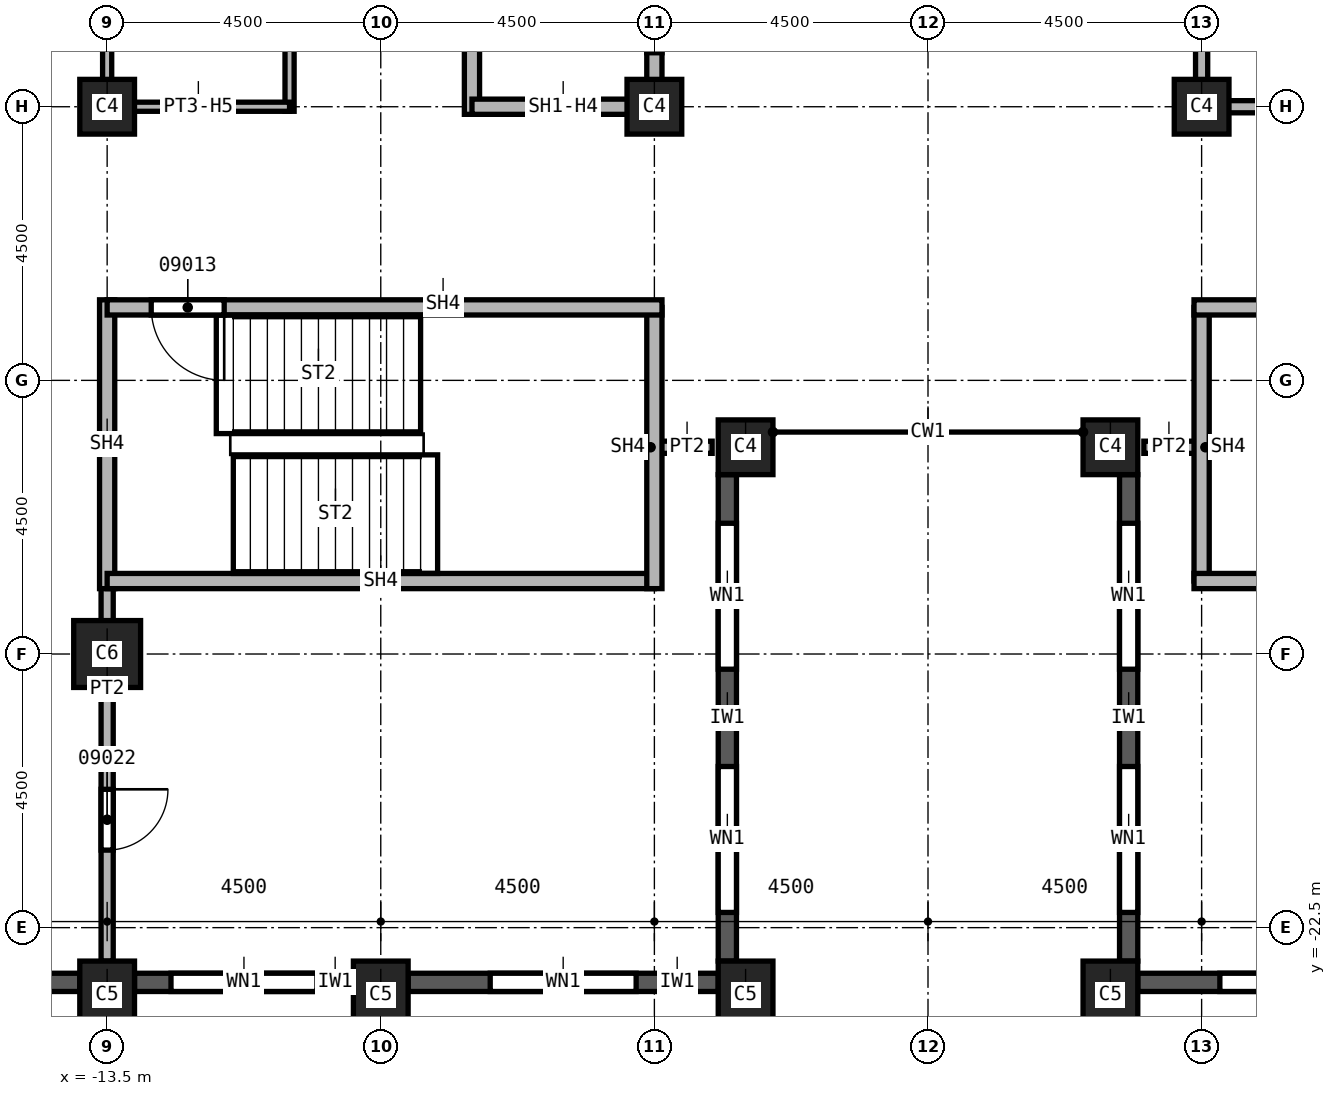
"""IFC4 building model, lengths in metres.
Left out: names, types, materials, properties, quantities, classifications, styles, units other than length and angle.
Written with IfcOpenShell. Run it as: python <this file> out.ifc"""

import sys

from ifc_helpers import new_model, si_unit, direction, frame, frame_2d, origin, origin_2d, place, context, subcontext, project, spatial, rectangle, extrude, element, fill, save


model = new_model("IFC4")
c1 = context("Model", 3, precision=1e-05, world=origin(), true_north=direction((0.0, 1.0)))
c2 = subcontext(c1, "Body", "Model", "MODEL_VIEW")
j1 = project(units=[si_unit("LENGTHUNIT", "METRE"), si_unit("PLANEANGLEUNIT", "RADIAN")], contexts=[c1])
p1 = place(None, origin())
s1 = spatial("IfcSite", under=j1, at=p1, CompositionType="ELEMENT")
p2 = place(p1, origin())
s2 = spatial("IfcBuilding", under=s1, at=p2, CompositionType="ELEMENT")
p3 = place(p2, frame((0.0, 0.0, 166.0)))
s3 = spatial("IfcBuildingStorey", under=s2, at=p3, CompositionType="ELEMENT", Elevation=166.0)
p4 = place(p3, frame((-13.5, -18.0, 0.0), z_axis=(0.0, 0.0, 1.0), x_axis=(1.0, 0.0, 0.0)))
e1 = element("IfcColumn", 1, at=p4, inside=s3, PredefinedType="COLUMN", context=c2, shape_type="SweptSolid", body=[
    extrude(rectangle(XDim=1.1, YDim=1.1, at=origin_2d()), origin(), (0.0, 0.0, 1.0), 3.7),
])
for number, where, z_axis, x_axis in (
    (2, (4.5, -9.0, 0.0), (0.0, 0.0, 1.0), (1.0, 0.0, 0.0)),
    (3, (-4.5, -9.0, 0.0), (0.0, 0.0, 1.0), (1.0, 0.0, 0.0)),
    (4, (-13.5, -9.0, 0.0), (0.0, 0.0, 1.0), (1.0, 0.0, 0.0)),
):
    element("IfcColumn", number, at=place(p3, frame(where, z_axis=z_axis, x_axis=x_axis)), inside=s3, PredefinedType="COLUMN", context=c2, shape_type="SweptSolid", body=[
        extrude(rectangle(XDim=0.9, YDim=0.9, at=origin_2d()), origin(), (0.0, 0.0, 1.0), 3.7),
    ])
for number, where, z_axis, x_axis in (
    (5, (3.0, -23.6, 0.0), (0.0, 0.0, 1.0), (1.0, 0.0, 0.0)),
    (6, (-3.0, -23.6, 0.0), (0.0, 0.0, 1.0), (1.0, 0.0, 0.0)),
    (7, (-9.0, -23.6, 0.0), (0.0, 0.0, 1.0), (1.0, 0.0, 0.0)),
    (8, (-13.5, -23.6, 0.0), (0.0, 0.0, 1.0), (1.0, 0.0, 0.0)),
):
    element("IfcColumn", number, at=place(p3, frame(where, z_axis=z_axis, x_axis=x_axis)), inside=s3, PredefinedType="COLUMN", context=c2, shape_type="SweptSolid", body=[
        extrude(rectangle(XDim=0.9, YDim=1.1, at=origin_2d()), origin(), (0.0, 0.0, 1.0), 3.7),
    ])
for number, where, z_axis, x_axis in (
    (9, (3.0, -14.6, 0.0), (0.0, 0.0, 1.0), (1.0, 0.0, 0.0)),
    (10, (-3.0, -14.6, 0.0), (0.0, 0.0, 1.0), (1.0, 0.0, 0.0)),
):
    element("IfcColumn", number, at=place(p3, frame(where, z_axis=z_axis, x_axis=x_axis)), inside=s3, PredefinedType="COLUMN", context=c2, shape_type="SweptSolid", body=[
        extrude(rectangle(XDim=0.9, YDim=0.9, at=origin_2d()), origin(), (0.0, 0.0, 1.0), 3.7),
    ])
p5 = place(p3, frame((-17.55, -23.4, 0.0), z_axis=(0.0, 0.0, 1.0), x_axis=(1.0, 0.0, 0.0)))
e11 = element("IfcWall", 11, at=p5, inside=s3, PredefinedType="SOLIDWALL", context=c2, shape_type="SweptSolid", body=[
    extrude(rectangle(XDim=3.6, YDim=0.3, at=frame_2d((1.8, 0.0))), origin(), (0.0, 0.0, 1.0), 3.1),
])
p6 = place(p5, frame((0.775, 0.0, 0.8)))
e12 = element("IfcOpeningElement", 12, at=p6, cuts=e11, PredefinedType="OPENING", context=c2, shape_type="SweptSolid", body=[
    extrude(rectangle(XDim=1.0, YDim=1.95, at=frame_2d((0.5, 0.975))), frame((0.0, 0.15, 0.0), z_axis=(0.0, -1.0, 0.0), x_axis=(1.0, 0.0, 0.0)), (0.0, 0.0, 1.0), 0.3),
])
p7 = place(p5, frame((2.375, 0.0, 0.8)))
e13 = element("IfcOpeningElement", 13, at=p7, cuts=e11, PredefinedType="OPENING", context=c2, shape_type="SweptSolid", body=[
    extrude(rectangle(XDim=0.6, YDim=1.95, at=frame_2d((0.3, 0.975))), frame((0.0, 0.15, 0.0), z_axis=(0.0, -1.0, 0.0), x_axis=(1.0, 0.0, 0.0)), (0.0, 0.0, 1.0), 0.3),
])
p8 = place(p3, frame((-13.05, -23.4, 0.0), z_axis=(0.0, 0.0, 1.0), x_axis=(1.0, 0.0, 0.0)))
e14 = element("IfcWall", 14, at=p8, inside=s3, PredefinedType="SOLIDWALL", context=c2, shape_type="SweptSolid", body=[
    extrude(rectangle(XDim=3.6, YDim=0.3, at=frame_2d((1.8, 0.0))), origin(), (0.0, 0.0, 1.0), 3.1),
])
p9 = place(p8, frame((0.6, 0.0, 0.8)))
e15 = element("IfcOpeningElement", 15, at=p9, cuts=e14, PredefinedType="OPENING", context=c2, shape_type="SweptSolid", body=[
    extrude(rectangle(XDim=2.4, YDim=1.95, at=frame_2d((1.2, 0.975))), frame((0.0, 0.15, 0.0), z_axis=(0.0, -1.0, 0.0), x_axis=(1.0, 0.0, 0.0)), (0.0, 0.0, 1.0), 0.3),
])
p10 = place(p3, frame((-8.55, -23.4, 0.0), z_axis=(0.0, 0.0, 1.0), x_axis=(1.0, 0.0, 0.0)))
e16 = element("IfcWall", 16, at=p10, inside=s3, PredefinedType="SOLIDWALL", context=c2, shape_type="SweptSolid", body=[
    extrude(rectangle(XDim=5.1, YDim=0.3, at=frame_2d((2.55, 0.0))), origin(), (0.0, 0.0, 1.0), 3.1),
])
p11 = place(p10, frame((1.35, 0.0, 0.8)))
e17 = element("IfcOpeningElement", 17, at=p11, cuts=e16, PredefinedType="OPENING", context=c2, shape_type="SweptSolid", body=[
    extrude(rectangle(XDim=2.4, YDim=1.95, at=frame_2d((1.2, 0.975))), frame((0.0, 0.15, 0.0), z_axis=(0.0, -1.0, 0.0), x_axis=(1.0, 0.0, 0.0)), (0.0, 0.0, 1.0), 0.3),
])
p12 = place(p3, frame((-3.3, -23.05, 0.0), z_axis=(0.0, 0.0, 1.0), x_axis=(0.0, 1.0, 0.0)))
e18 = element("IfcWall", 18, at=p12, inside=s3, PredefinedType="SOLIDWALL", context=c2, shape_type="SweptSolid", body=[
    extrude(rectangle(XDim=8.0, YDim=0.3, at=frame_2d((4.0, 0.0))), origin(), (0.0, 0.0, 1.0), 3.1),
])
p13 = place(p12, frame((0.8, 0.0, 0.8)))
e19 = element("IfcOpeningElement", 19, at=p13, cuts=e18, PredefinedType="OPENING", context=c2, shape_type="SweptSolid", body=[
    extrude(rectangle(XDim=2.4, YDim=1.95, at=frame_2d((1.2, 0.975))), frame((0.0, 0.15, 0.0), z_axis=(0.0, -1.0, 0.0), x_axis=(1.0, 0.0, 0.0)), (0.0, 0.0, 1.0), 0.3),
])
p14 = place(p12, frame((4.8, 0.0, 0.8)))
e20 = element("IfcOpeningElement", 20, at=p14, cuts=e18, PredefinedType="OPENING", context=c2, shape_type="SweptSolid", body=[
    extrude(rectangle(XDim=2.4, YDim=1.95, at=frame_2d((1.2, 0.975))), frame((0.0, 0.15, 0.0), z_axis=(0.0, -1.0, 0.0), x_axis=(1.0, 0.0, 0.0)), (0.0, 0.0, 1.0), 0.3),
])
p15 = place(p3, frame((3.3, -15.05, 0.0), z_axis=(0.0, 0.0, 1.0), x_axis=(0.0, -1.0, 0.0)))
e21 = element("IfcWall", 21, at=p15, inside=s3, PredefinedType="SOLIDWALL", context=c2, shape_type="SweptSolid", body=[
    extrude(rectangle(XDim=8.0, YDim=0.3, at=frame_2d((4.0, 0.0))), origin(), (0.0, 0.0, 1.0), 3.1),
])
p16 = place(p15, frame((0.8, 0.0, 0.8)))
e22 = element("IfcOpeningElement", 22, at=p16, cuts=e21, PredefinedType="OPENING", context=c2, shape_type="SweptSolid", body=[
    extrude(rectangle(XDim=2.4, YDim=1.95, at=frame_2d((1.2, 0.975))), frame((0.0, 0.15, 0.0), z_axis=(0.0, -1.0, 0.0), x_axis=(1.0, 0.0, 0.0)), (0.0, 0.0, 1.0), 0.3),
])
p17 = place(p15, frame((4.8, 0.0, 0.8)))
e23 = element("IfcOpeningElement", 23, at=p17, cuts=e21, PredefinedType="OPENING", context=c2, shape_type="SweptSolid", body=[
    extrude(rectangle(XDim=2.4, YDim=1.95, at=frame_2d((1.2, 0.975))), frame((0.0, 0.15, 0.0), z_axis=(0.0, -1.0, 0.0), x_axis=(1.0, 0.0, 0.0)), (0.0, 0.0, 1.0), 0.3),
])
p18 = place(p3, frame((3.45, -23.4, 0.0), z_axis=(0.0, 0.0, 1.0), x_axis=(1.0, 0.0, 0.0)))
e24 = element("IfcWall", 24, at=p18, inside=s3, PredefinedType="SOLIDWALL", context=c2, shape_type="SweptSolid", body=[
    extrude(rectangle(XDim=5.1, YDim=0.3, at=frame_2d((2.55, 0.0))), origin(), (0.0, 0.0, 1.0), 3.1),
])
p19 = place(p18, frame((1.35, 0.0, 0.8)))
e25 = element("IfcOpeningElement", 25, at=p19, cuts=e24, PredefinedType="OPENING", context=c2, shape_type="SweptSolid", body=[
    extrude(rectangle(XDim=2.4, YDim=1.95, at=frame_2d((1.2, 0.975))), frame((0.0, 0.15, 0.0), z_axis=(0.0, -1.0, 0.0), x_axis=(1.0, 0.0, 0.0)), (0.0, 0.0, 1.0), 0.3),
])
p20 = place(p3, frame((-13.5, -16.675, 0.0), z_axis=(0.0, 0.0, 1.0), x_axis=(0.0, -1.0, 0.0)))
e26 = element("IfcWall", 26, at=p20, inside=s3, PredefinedType="PARTITIONING", context=c2, shape_type="SweptSolid", body=[
    extrude(rectangle(XDim=6.375, YDim=0.2, at=frame_2d((3.188, 0.0))), origin(), (0.0, 0.0, 1.0), 3.7),
])
p21 = place(p20, frame((3.55, 0.0, 0.0)))
e27 = element("IfcOpeningElement", 27, at=p21, cuts=e26, PredefinedType="OPENING", context=c2, shape_type="SweptSolid", body=[
    extrude(rectangle(XDim=1.0, YDim=2.1, at=frame_2d((0.5, 1.05))), frame((0.0, 0.1, 0.0), z_axis=(0.0, -1.0, 0.0), x_axis=(1.0, 0.0, 0.0)), (0.0, 0.0, 1.0), 0.2),
])
for number, where, z_axis, x_axis in (
    (28, (-3.55, -14.6, 0.0), (0.0, 0.0, 1.0), (-1.0, 0.0, 0.0)),
    (29, (4.5, -14.6, 0.0), (0.0, 0.0, 1.0), (-1.0, 0.0, 0.0)),
):
    element("IfcWall", number, at=place(p3, frame(where, z_axis=z_axis, x_axis=x_axis)), inside=s3, PredefinedType="PARTITIONING", context=c2, shape_type="SweptSolid", body=[
        extrude(rectangle(XDim=0.95, YDim=0.2, at=frame_2d((0.475, 0.0))), origin(), (0.0, 0.0, 1.0), 3.7),
    ])
p22 = place(p3, frame((4.5, -9.1, 0.0), z_axis=(0.0, 0.0, 1.0), x_axis=(0.0, 1.0, 0.0)))
e30 = element("IfcWall", 30, at=p22, inside=s3, PredefinedType="SOLIDWALL", context=c2, shape_type="SweptSolid", body=[
    extrude(rectangle(XDim=9.1, YDim=0.2, at=frame_2d((4.55, 0.0))), origin(), (0.0, 0.0, 1.0), 2.938),
])
p23 = place(p22, frame((3.1, 0.0, 0.0)))
e31 = element("IfcOpeningElement", 31, at=p23, cuts=e30, PredefinedType="OPENING", context=c2, shape_type="SweptSolid", body=[
    extrude(rectangle(XDim=1.1, YDim=2.1, at=frame_2d((0.55, 1.05))), frame((0.0, 0.1, 0.0), z_axis=(0.0, -1.0, 0.0), x_axis=(1.0, 0.0, 0.0)), (0.0, 0.0, 1.0), 0.2),
])
p24 = place(p3, frame((7.5, -9.0, 0.0), z_axis=(0.0, 0.0, 1.0), x_axis=(-1.0, 0.0, 0.0)))
e32 = element("IfcWall", 32, at=p24, inside=s3, PredefinedType="SOLIDWALL", context=c2, shape_type="SweptSolid", body=[
    extrude(rectangle(XDim=3.0, YDim=0.2, at=frame_2d((1.5, 0.0))), origin(), (0.0, 0.0, 1.0), 2.938),
])
p25 = place(p3, frame((-7.5, -9.125, 0.0), z_axis=(0.0, 0.0, 1.0), x_axis=(0.0, 1.0, 0.0)))
e33 = element("IfcWall", 33, at=p25, inside=s3, PredefinedType="SOLIDWALL", context=c2, shape_type="SweptSolid", body=[
    extrude(rectangle(XDim=12.25, YDim=0.25, at=frame_2d((6.125, 0.0))), origin(), (0.0, 0.0, 1.0), 3.7),
])
p26 = place(p3, frame((-4.5, -9.0, 0.0), z_axis=(0.0, 0.0, 1.0), x_axis=(-1.0, 0.0, 0.0)))
e34 = element("IfcWall", 34, at=p26, inside=s3, PredefinedType="SOLIDWALL", context=c2, shape_type="SweptSolid", body=[
    extrude(rectangle(XDim=3.0, YDim=0.25, at=frame_2d((1.5, 0.0))), origin(), (0.0, 0.0, 1.0), 2.938),
])
p27 = place(p3, frame((-4.5, 0.0, 0.0), z_axis=(0.0, 0.0, 1.0), x_axis=(0.0, -1.0, 0.0)))
e35 = element("IfcWall", 35, at=p27, inside=s3, PredefinedType="SOLIDWALL", context=c2, shape_type="SweptSolid", body=[
    extrude(rectangle(XDim=9.125, YDim=0.25, at=frame_2d((4.562, 0.0))), origin(), (0.0, 0.0, 1.0), 2.938),
])
p28 = place(p27, frame((7.012, 0.0, 0.0)))
e36 = element("IfcOpeningElement", 36, at=p28, cuts=e35, PredefinedType="OPENING", context=c2, shape_type="SweptSolid", body=[
    extrude(rectangle(XDim=1.1, YDim=2.1, at=frame_2d((0.55, 1.05))), frame((0.0, 0.125, 0.0), z_axis=(0.0, -1.0, 0.0), x_axis=(1.0, 0.0, 0.0)), (0.0, 0.0, 1.0), 0.25),
])
p29 = place(p27, frame((3.95, 0.0, 0.0)))
e37 = element("IfcOpeningElement", 37, at=p29, cuts=e35, PredefinedType="OPENING", context=c2, shape_type="SweptSolid", body=[
    extrude(rectangle(XDim=1.1, YDim=2.1, at=frame_2d((0.55, 1.05))), frame((0.0, 0.125, 0.0), z_axis=(0.0, -1.0, 0.0), x_axis=(1.0, 0.0, 0.0)), (0.0, 0.0, 1.0), 0.25),
])
p30 = place(p27, frame((0.95, 0.0, 0.0)))
e38 = element("IfcOpeningElement", 38, at=p30, cuts=e35, PredefinedType="OPENING", context=c2, shape_type="SweptSolid", body=[
    extrude(rectangle(XDim=1.1, YDim=2.1, at=frame_2d((0.55, 1.05))), frame((0.0, 0.125, 0.0), z_axis=(0.0, -1.0, 0.0), x_axis=(1.0, 0.0, 0.0)), (0.0, 0.0, 1.0), 0.25),
])
p31 = place(p3, frame((-13.5, -12.175, 0.0), z_axis=(0.0, 0.0, 1.0), x_axis=(0.0, -1.0, 0.0)))
e39 = element("IfcWall", 39, at=p31, inside=s3, PredefinedType="SOLIDWALL", context=c2, shape_type="SweptSolid", body=[
    extrude(rectangle(XDim=4.75, YDim=0.25, at=frame_2d((2.375, 0.0))), origin(), (0.0, 0.0, 1.0), 3.7),
])
p32 = place(p3, frame((-4.5, -16.8, 0.0), z_axis=(0.0, 0.0, 1.0), x_axis=(-1.0, 0.0, 0.0)))
e40 = element("IfcWall", 40, at=p32, inside=s3, PredefinedType="SOLIDWALL", context=c2, shape_type="SweptSolid", body=[
    extrude(rectangle(XDim=9.0, YDim=0.25, at=frame_2d((4.5, 0.0))), origin(), (0.0, 0.0, 1.0), 3.7),
])
p33 = place(p3, frame((-4.5, -12.3, 0.0), z_axis=(0.0, 0.0, 1.0), x_axis=(0.0, -1.0, 0.0)))
e41 = element("IfcWall", 41, at=p33, inside=s3, PredefinedType="SOLIDWALL", context=c2, shape_type="SweptSolid", body=[
    extrude(rectangle(XDim=4.625, YDim=0.25, at=frame_2d((2.312, 0.0))), origin(), (0.0, 0.0, 1.0), 3.7),
])
p34 = place(p3, frame((-4.375, -12.3, 0.0), z_axis=(0.0, 0.0, 1.0), x_axis=(-1.0, 0.0, 0.0)))
e42 = element("IfcWall", 42, at=p34, inside=s3, PredefinedType="SOLIDWALL", context=c2, shape_type="SweptSolid", body=[
    extrude(rectangle(XDim=9.125, YDim=0.25, at=frame_2d((4.562, 0.0))), origin(), (0.0, 0.0, 1.0), 3.7),
])
p35 = place(p34, frame((7.2, 0.0, 0.0)))
e43 = element("IfcOpeningElement", 43, at=p35, cuts=e42, PredefinedType="OPENING", context=c2, shape_type="SweptSolid", body=[
    extrude(rectangle(XDim=1.2, YDim=2.1, at=frame_2d((0.6, 1.05))), frame((0.0, 0.125, 0.0), z_axis=(0.0, -1.0, 0.0), x_axis=(1.0, 0.0, 0.0)), (0.0, 0.0, 1.0), 0.25),
])
p36 = place(p3, frame((4.5, -16.8, 0.0), z_axis=(0.0, 0.0, 1.0), x_axis=(0.0, 1.0, 0.0)))
e44 = element("IfcWall", 44, at=p36, inside=s3, PredefinedType="SOLIDWALL", context=c2, shape_type="SweptSolid", body=[
    extrude(rectangle(XDim=4.5, YDim=0.25, at=frame_2d((2.25, 0.0))), origin(), (0.0, 0.0, 1.0), 3.7),
])
p37 = place(p3, frame((13.5, -16.8, 0.0), z_axis=(0.0, 0.0, 1.0), x_axis=(-1.0, 0.0, 0.0)))
e45 = element("IfcWall", 45, at=p37, inside=s3, PredefinedType="SOLIDWALL", context=c2, shape_type="SweptSolid", body=[
    extrude(rectangle(XDim=9.125, YDim=0.25, at=frame_2d((4.562, 0.0))), origin(), (0.0, 0.0, 1.0), 3.7),
])
p38 = place(p3, frame((13.5, -12.3, 0.0), z_axis=(0.0, 0.0, 1.0), x_axis=(-1.0, 0.0, 0.0)))
e46 = element("IfcWall", 46, at=p38, inside=s3, PredefinedType="SOLIDWALL", context=c2, shape_type="SweptSolid", body=[
    extrude(rectangle(XDim=9.125, YDim=0.25, at=frame_2d((4.562, 0.0))), origin(), (0.0, 0.0, 1.0), 3.7),
])
p39 = place(p38, frame((0.6, 0.0, 0.0)))
e47 = element("IfcOpeningElement", 47, at=p39, cuts=e46, PredefinedType="OPENING", context=c2, shape_type="SweptSolid", body=[
    extrude(rectangle(XDim=1.2, YDim=2.1, at=frame_2d((0.6, 1.05))), frame((0.0, 0.125, 0.0), z_axis=(0.0, -1.0, 0.0), x_axis=(1.0, 0.0, 0.0)), (0.0, 0.0, 1.0), 0.25),
])
p40 = place(p3, frame((-13.5, -9.075, 0.0), z_axis=(0.0, 0.0, 1.0), x_axis=(0.0, 1.0, 0.0)))
e48 = element("IfcWall", 48, at=p40, inside=s3, PredefinedType="PARTITIONING", context=c2, shape_type="SweptSolid", body=[
    extrude(rectangle(XDim=4.575, YDim=0.15, at=frame_2d((2.288, 0.0))), origin(), (0.0, 0.0, 1.0), 2.938),
])
p41 = place(p3, frame((-10.5, -9.075, 0.0), z_axis=(0.0, 0.0, 1.0), x_axis=(0.0, 1.0, 0.0)))
e49 = element("IfcWall", 49, at=p41, inside=s3, PredefinedType="PARTITIONING", context=c2, shape_type="SweptSolid", body=[
    extrude(rectangle(XDim=4.65, YDim=0.15, at=frame_2d((2.325, 0.0))), origin(), (0.0, 0.0, 1.0), 3.7),
])
p42 = place(p41, frame((3.4, 0.0, 0.0)))
e50 = element("IfcOpeningElement", 50, at=p42, cuts=e49, PredefinedType="OPENING", context=c2, shape_type="SweptSolid", body=[
    extrude(rectangle(XDim=0.9, YDim=2.1, at=frame_2d((0.45, 1.05))), frame((0.0, 0.075, 0.0), z_axis=(0.0, -1.0, 0.0), x_axis=(1.0, 0.0, 0.0)), (0.0, 0.0, 1.0), 0.15),
])
p43 = place(p3, frame((-10.5, -9.0, 0.0), z_axis=(0.0, 0.0, 1.0), x_axis=(-1.0, 0.0, 0.0)))
e51 = element("IfcWall", 51, at=p43, inside=s3, PredefinedType="PARTITIONING", context=c2, shape_type="SweptSolid", body=[
    extrude(rectangle(XDim=3.0, YDim=0.15, at=frame_2d((1.5, 0.0))), origin(), (0.0, 0.0, 1.0), 2.938),
])
p44 = place(p9, origin())
e52 = element("IfcWindow", 52, at=p44, inside=s3, PartitioningType="SINGLE_PANEL", PredefinedType="WINDOW", context=c2, shape_type="SweptSolid", body=[
    extrude(rectangle(XDim=2.4, YDim=1.95, at=frame_2d((1.2, 0.975))), frame((0.0, 0.03, 0.0), z_axis=(0.0, -1.0, 0.0), x_axis=(1.0, 0.0, 0.0)), (0.0, 0.0, 1.0), 0.06),
])
fill(e15, e52)
p45 = place(p11, origin())
e53 = element("IfcWindow", 53, at=p45, inside=s3, PartitioningType="SINGLE_PANEL", PredefinedType="WINDOW", context=c2, shape_type="SweptSolid", body=[
    extrude(rectangle(XDim=2.4, YDim=1.95, at=frame_2d((1.2, 0.975))), frame((0.0, 0.03, 0.0), z_axis=(0.0, -1.0, 0.0), x_axis=(1.0, 0.0, 0.0)), (0.0, 0.0, 1.0), 0.06),
])
fill(e17, e53)
p46 = place(p13, origin())
e54 = element("IfcWindow", 54, at=p46, inside=s3, PartitioningType="SINGLE_PANEL", PredefinedType="WINDOW", context=c2, shape_type="SweptSolid", body=[
    extrude(rectangle(XDim=2.4, YDim=1.95, at=frame_2d((1.2, 0.975))), frame((0.0, 0.03, 0.0), z_axis=(0.0, -1.0, 0.0), x_axis=(1.0, 0.0, 0.0)), (0.0, 0.0, 1.0), 0.06),
])
fill(e19, e54)
p47 = place(p14, origin())
e55 = element("IfcWindow", 55, at=p47, inside=s3, PartitioningType="SINGLE_PANEL", PredefinedType="WINDOW", context=c2, shape_type="SweptSolid", body=[
    extrude(rectangle(XDim=2.4, YDim=1.95, at=frame_2d((1.2, 0.975))), frame((0.0, 0.03, 0.0), z_axis=(0.0, -1.0, 0.0), x_axis=(1.0, 0.0, 0.0)), (0.0, 0.0, 1.0), 0.06),
])
fill(e20, e55)
p48 = place(p16, origin())
e56 = element("IfcWindow", 56, at=p48, inside=s3, PartitioningType="SINGLE_PANEL", PredefinedType="WINDOW", context=c2, shape_type="SweptSolid", body=[
    extrude(rectangle(XDim=2.4, YDim=1.95, at=frame_2d((1.2, 0.975))), frame((0.0, 0.03, 0.0), z_axis=(0.0, -1.0, 0.0), x_axis=(1.0, 0.0, 0.0)), (0.0, 0.0, 1.0), 0.06),
])
fill(e22, e56)
p49 = place(p17, origin())
e57 = element("IfcWindow", 57, at=p49, inside=s3, PartitioningType="SINGLE_PANEL", PredefinedType="WINDOW", context=c2, shape_type="SweptSolid", body=[
    extrude(rectangle(XDim=2.4, YDim=1.95, at=frame_2d((1.2, 0.975))), frame((0.0, 0.03, 0.0), z_axis=(0.0, -1.0, 0.0), x_axis=(1.0, 0.0, 0.0)), (0.0, 0.0, 1.0), 0.06),
])
fill(e23, e57)
p50 = place(p19, origin())
e58 = element("IfcWindow", 58, at=p50, inside=s3, PartitioningType="SINGLE_PANEL", PredefinedType="WINDOW", context=c2, shape_type="SweptSolid", body=[
    extrude(rectangle(XDim=2.4, YDim=1.95, at=frame_2d((1.2, 0.975))), frame((0.0, 0.03, 0.0), z_axis=(0.0, -1.0, 0.0), x_axis=(1.0, 0.0, 0.0)), (0.0, 0.0, 1.0), 0.06),
])
fill(e25, e58)
p51 = place(p35, origin())
e59 = element("IfcDoor", 59, at=p51, inside=s3, OperationType="SINGLE_SWING_RIGHT", PredefinedType="DOOR", context=c2, shape_type="SweptSolid", body=[
    extrude(rectangle(XDim=1.2, YDim=2.1, at=frame_2d((0.6, 1.05))), frame((0.0, 0.025, 0.0), z_axis=(0.0, -1.0, 0.0), x_axis=(1.0, 0.0, 0.0)), (0.0, 0.0, 1.0), 0.05),
])
fill(e43, e59)
p52 = place(p21, origin())
e60 = element("IfcDoor", 60, at=p52, inside=s3, OperationType="SINGLE_SWING_LEFT", PredefinedType="DOOR", context=c2, shape_type="SweptSolid", body=[
    extrude(rectangle(XDim=1.0, YDim=2.1, at=frame_2d((0.5, 1.05))), frame((0.0, 0.025, 0.0), z_axis=(0.0, -1.0, 0.0), x_axis=(1.0, 0.0, 0.0)), (0.0, 0.0, 1.0), 0.05),
])
fill(e27, e60)
p53 = place(p28, origin())
e61 = element("IfcDoor", 61, at=p53, inside=s3, OperationType="SLIDING_TO_LEFT", PredefinedType="DOOR", context=c2, shape_type="SweptSolid", body=[
    extrude(rectangle(XDim=1.1, YDim=2.1, at=frame_2d((0.55, 1.05))), frame((0.0, 0.025, 0.0), z_axis=(0.0, -1.0, 0.0), x_axis=(1.0, 0.0, 0.0)), (0.0, 0.0, 1.0), 0.05),
])
fill(e36, e61)
save(model, sys.argv[1])
